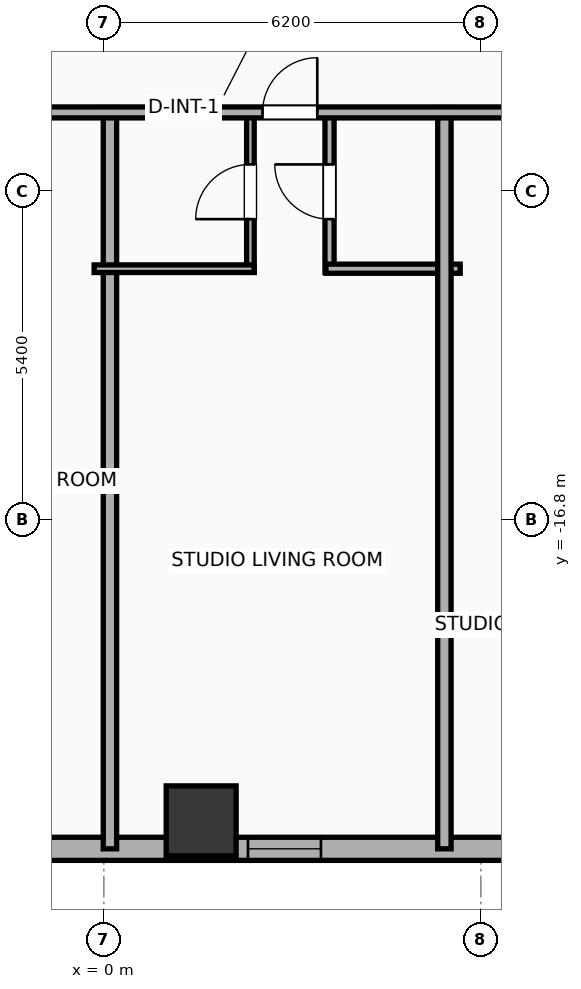
"""IFC4 building model, lengths in metres.
Left out: names, types, materials, properties, quantities, classifications, styles, units other than length and angle.
Written with IfcOpenShell. Run it as: python <this file> out.ifc"""

import sys

from ifc_helpers import new_model, si_unit, direction, frame, frame_2d, origin, origin_2d, place, context, subcontext, project, spatial, rectangle, hollow_rectangle, extrude, element, fill, save


model = new_model("IFC4")
c1 = context("Model", 3, precision=1e-05, world=origin(), true_north=direction((0.0, 1.0)))
c2 = subcontext(c1, "Body", "Model", "MODEL_VIEW")
j1 = project(units=[si_unit("LENGTHUNIT", "METRE"), si_unit("PLANEANGLEUNIT", "RADIAN")], contexts=[c1])
p1 = place(None, origin())
s1 = spatial("IfcSite", under=j1, at=p1, CompositionType="ELEMENT")
p2 = place(p1, origin())
s2 = spatial("IfcBuilding", under=s1, at=p2, CompositionType="ELEMENT")
p3 = place(p2, frame((0.0, 0.0, 37.7)))
s3 = spatial("IfcBuildingStorey", under=s2, at=p3, CompositionType="ELEMENT", Elevation=37.7)
p4 = place(p3, frame((1.6, -21.75, 0.0), z_axis=(0.0, 0.0, 1.0), x_axis=(1.0, 0.0, 0.0)))
e1 = element("IfcColumn", 1, at=p4, inside=s3, PredefinedType="COLUMN", context=c2, shape_type="SweptSolid", body=[
    extrude(hollow_rectangle(XDim=1.15, YDim=1.15, WallThickness=0.04, at=origin_2d()), origin(), (0.0, 0.0, 1.0), 3.9),
])
p5 = place(p3, frame((22.381, -22.21, 0.0), z_axis=(0.0, 0.0, 1.0), x_axis=(-1.0, 0.0, 0.0)))
e2 = element("IfcWall", 2, at=p5, inside=s3, PredefinedType="ELEMENTEDWALL", context=c2, shape_type="SweptSolid", body=[
    extrude(rectangle(XDim=51.963, YDim=0.38, at=frame_2d((25.981, 0.0))), origin(), (0.0, 0.0, 1.0), 3.65),
])
p6 = place(p5, frame((42.952, 0.0, 0.75)))
e3 = element("IfcOpeningElement", 3, at=p6, cuts=e2, PredefinedType="OPENING", context=c2, shape_type="SweptSolid", body=[
    extrude(rectangle(XDim=2.4, YDim=2.1, at=frame_2d((1.2, 1.05))), frame((0.0, 0.2, 0.0), z_axis=(0.0, -1.0, 0.0), x_axis=(1.0, 0.0, 0.0)), (0.0, 0.0, 1.0), 0.4),
])
p7 = place(p5, frame((49.847, 0.0, 0.75)))
e4 = element("IfcOpeningElement", 4, at=p7, cuts=e2, PredefinedType="OPENING", context=c2, shape_type="SweptSolid", body=[
    extrude(rectangle(XDim=1.2, YDim=2.05, at=frame_2d((0.6, 1.025))), frame((0.0, 0.2, 0.0), z_axis=(0.0, -1.0, 0.0), x_axis=(1.0, 0.0, 0.0)), (0.0, 0.0, 1.0), 0.4),
])
p8 = place(p5, frame((47.445, 0.0, 0.75)))
e5 = element("IfcOpeningElement", 5, at=p8, cuts=e2, PredefinedType="OPENING", context=c2, shape_type="SweptSolid", body=[
    extrude(rectangle(XDim=1.2, YDim=2.05, at=frame_2d((0.6, 1.025))), frame((0.0, 0.2, 0.0), z_axis=(0.0, -1.0, 0.0), x_axis=(1.0, 0.0, 0.0)), (0.0, 0.0, 1.0), 0.4),
])
p9 = place(p5, frame((39.526, 0.0, 0.75)))
e6 = element("IfcOpeningElement", 6, at=p9, cuts=e2, PredefinedType="OPENING", context=c2, shape_type="SweptSolid", body=[
    extrude(rectangle(XDim=1.2, YDim=2.05, at=frame_2d((0.6, 1.025))), frame((0.0, 0.2, 0.0), z_axis=(0.0, -1.0, 0.0), x_axis=(1.0, 0.0, 0.0)), (0.0, 0.0, 1.0), 0.4),
])
p10 = place(p5, frame((33.018, 0.0, 0.75)))
e7 = element("IfcOpeningElement", 7, at=p10, cuts=e2, PredefinedType="OPENING", context=c2, shape_type="SweptSolid", body=[
    extrude(rectangle(XDim=1.2, YDim=2.05, at=frame_2d((0.6, 1.025))), frame((0.0, 0.2, 0.0), z_axis=(0.0, -1.0, 0.0), x_axis=(1.0, 0.0, 0.0)), (0.0, 0.0, 1.0), 0.4),
])
p11 = place(p5, frame((36.813, 0.0, 0.75)))
e8 = element("IfcOpeningElement", 8, at=p11, cuts=e2, PredefinedType="OPENING", context=c2, shape_type="SweptSolid", body=[
    extrude(rectangle(XDim=1.2, YDim=2.05, at=frame_2d((0.6, 1.025))), frame((0.0, 0.2, 0.0), z_axis=(0.0, -1.0, 0.0), x_axis=(1.0, 0.0, 0.0)), (0.0, 0.0, 1.0), 0.4),
])
p12 = place(p5, frame((28.886, 0.0, 0.75)))
e9 = element("IfcOpeningElement", 9, at=p12, cuts=e2, PredefinedType="OPENING", context=c2, shape_type="SweptSolid", body=[
    extrude(rectangle(XDim=1.2, YDim=2.05, at=frame_2d((0.6, 1.025))), frame((0.0, 0.2, 0.0), z_axis=(0.0, -1.0, 0.0), x_axis=(1.0, 0.0, 0.0)), (0.0, 0.0, 1.0), 0.4),
])
p13 = place(p5, frame((23.306, 0.0, 0.75)))
e10 = element("IfcOpeningElement", 10, at=p13, cuts=e2, PredefinedType="OPENING", context=c2, shape_type="SweptSolid", body=[
    extrude(rectangle(XDim=1.2, YDim=2.05, at=frame_2d((0.6, 1.025))), frame((0.0, 0.2, 0.0), z_axis=(0.0, -1.0, 0.0), x_axis=(1.0, 0.0, 0.0)), (0.0, 0.0, 1.0), 0.4),
])
p14 = place(p5, frame((26.056, 0.0, 0.75)))
e11 = element("IfcOpeningElement", 11, at=p14, cuts=e2, PredefinedType="OPENING", context=c2, shape_type="SweptSolid", body=[
    extrude(rectangle(XDim=1.2, YDim=2.05, at=frame_2d((0.6, 1.025))), frame((0.0, 0.2, 0.0), z_axis=(0.0, -1.0, 0.0), x_axis=(1.0, 0.0, 0.0)), (0.0, 0.0, 1.0), 0.4),
])
p15 = place(p5, frame((18.811, 0.0, 0.75)))
e12 = element("IfcOpeningElement", 12, at=p15, cuts=e2, PredefinedType="OPENING", context=c2, shape_type="SweptSolid", body=[
    extrude(rectangle(XDim=1.2, YDim=2.05, at=frame_2d((0.6, 1.025))), frame((0.0, 0.2, 0.0), z_axis=(0.0, -1.0, 0.0), x_axis=(1.0, 0.0, 0.0)), (0.0, 0.0, 1.0), 0.4),
])
p16 = place(p5, frame((14.602, 0.0, 0.75)))
e13 = element("IfcOpeningElement", 13, at=p16, cuts=e2, PredefinedType="OPENING", context=c2, shape_type="SweptSolid", body=[
    extrude(rectangle(XDim=1.2, YDim=2.05, at=frame_2d((0.6, 1.025))), frame((0.0, 0.2, 0.0), z_axis=(0.0, -1.0, 0.0), x_axis=(1.0, 0.0, 0.0)), (0.0, 0.0, 1.0), 0.4),
])
p17 = place(p5, frame((11.852, 0.0, 0.75)))
e14 = element("IfcOpeningElement", 14, at=p17, cuts=e2, PredefinedType="OPENING", context=c2, shape_type="SweptSolid", body=[
    extrude(rectangle(XDim=1.2, YDim=2.05, at=frame_2d((0.6, 1.025))), frame((0.0, 0.2, 0.0), z_axis=(0.0, -1.0, 0.0), x_axis=(1.0, 0.0, 0.0)), (0.0, 0.0, 1.0), 0.4),
])
p18 = place(p5, frame((8.316, 0.0, 0.75)))
e15 = element("IfcOpeningElement", 15, at=p18, cuts=e2, PredefinedType="OPENING", context=c2, shape_type="SweptSolid", body=[
    extrude(rectangle(XDim=1.2, YDim=2.05, at=frame_2d((0.6, 1.025))), frame((0.0, 0.2, 0.0), z_axis=(0.0, -1.0, 0.0), x_axis=(1.0, 0.0, 0.0)), (0.0, 0.0, 1.0), 0.4),
])
p19 = place(p5, frame((6.286, 0.0, 0.75)))
e16 = element("IfcOpeningElement", 16, at=p19, cuts=e2, PredefinedType="OPENING", context=c2, shape_type="SweptSolid", body=[
    extrude(rectangle(XDim=1.2, YDim=2.05, at=frame_2d((0.6, 1.025))), frame((0.0, 0.2, 0.0), z_axis=(0.0, -1.0, 0.0), x_axis=(1.0, 0.0, 0.0)), (0.0, 0.0, 1.0), 0.4),
])
p20 = place(p5, frame((3.737, 0.0, 0.75)))
e17 = element("IfcOpeningElement", 17, at=p20, cuts=e2, PredefinedType="OPENING", context=c2, shape_type="SweptSolid", body=[
    extrude(rectangle(XDim=1.2, YDim=2.05, at=frame_2d((0.6, 1.025))), frame((0.0, 0.2, 0.0), z_axis=(0.0, -1.0, 0.0), x_axis=(1.0, 0.0, 0.0)), (0.0, 0.0, 1.0), 0.4),
])
p21 = place(p5, frame((1.291, 0.0, 0.75)))
e18 = element("IfcOpeningElement", 18, at=p21, cuts=e2, PredefinedType="OPENING", context=c2, shape_type="SweptSolid", body=[
    extrude(rectangle(XDim=1.2, YDim=2.05, at=frame_2d((0.6, 1.025))), frame((0.0, 0.2, 0.0), z_axis=(0.0, -1.0, 0.0), x_axis=(1.0, 0.0, 0.0)), (0.0, 0.0, 1.0), 0.4),
])
p22 = place(p3, frame((0.1, -22.21, 0.0), z_axis=(0.0, 0.0, 1.0), x_axis=(0.0, 1.0, 0.0)))
e19 = element("IfcWall", 19, at=p22, inside=s3, PredefinedType="PARTITIONING", context=c2, shape_type="SweptSolid", body=[
    extrude(rectangle(XDim=12.19, YDim=0.22, at=frame_2d((6.095, 0.0))), origin(), (0.0, 0.0, 1.0), 3.65),
])
p23 = place(p3, frame((2.41, -12.73, 0.0), z_axis=(0.0, 0.0, 1.0), x_axis=(0.0, 1.0, 0.0)))
e20 = element("IfcWall", 20, at=p23, inside=s3, PredefinedType="PARTITIONING", context=c2, shape_type="SweptSolid", body=[
    extrude(rectangle(XDim=2.65, YDim=0.125, at=frame_2d((1.325, 0.0))), origin(), (0.0, 0.0, 1.0), 3.65),
])
p24 = place(p23, frame((0.875, 0.0, 0.0)))
e21 = element("IfcOpeningElement", 21, at=p24, cuts=e20, PredefinedType="OPENING", context=c2, shape_type="SweptSolid", body=[
    extrude(rectangle(XDim=0.9, YDim=2.05, at=frame_2d((0.45, 1.025))), frame((0.0, 0.073, 0.0), z_axis=(0.0, -1.0, 0.0), x_axis=(1.0, 0.0, 0.0)), (0.0, 0.0, 1.0), 0.145),
])
p25 = place(p3, frame((3.711, -12.73, 0.0), z_axis=(0.0, 0.0, 1.0), x_axis=(0.0, 1.0, 0.0)))
e22 = element("IfcWall", 22, at=p25, inside=s3, PredefinedType="PLUMBINGWALL", context=c2, shape_type="SweptSolid", body=[
    extrude(rectangle(XDim=2.65, YDim=0.15, at=frame_2d((1.325, 0.0))), origin(), (0.0, 0.0, 1.0), 2.94),
])
p26 = place(p25, frame((0.875, 0.0, 0.0)))
e23 = element("IfcOpeningElement", 23, at=p26, cuts=e22, PredefinedType="OPENING", context=c2, shape_type="SweptSolid", body=[
    extrude(rectangle(XDim=0.9, YDim=2.05, at=frame_2d((0.45, 1.025))), frame((0.0, 0.085, 0.0), z_axis=(0.0, -1.0, 0.0), x_axis=(1.0, 0.0, 0.0)), (0.0, 0.0, 1.0), 0.17),
])
p27 = place(p3, frame((-0.16, -12.67, 0.0), z_axis=(0.0, 0.0, 1.0), x_axis=(1.0, 0.0, 0.0)))
e24 = element("IfcWall", 24, at=p27, inside=s3, PredefinedType="PARTITIONING", context=c2, shape_type="SweptSolid", body=[
    extrude(rectangle(XDim=2.63, YDim=0.125, at=frame_2d((1.315, 0.0))), origin(), (0.0, 0.0, 1.0), 3.65),
])
p28 = place(p3, frame((3.651, -12.67, 0.0), z_axis=(0.0, 0.0, 1.0), x_axis=(1.0, 0.0, 0.0)))
e25 = element("IfcWall", 25, at=p28, inside=s3, PredefinedType="PLUMBINGWALL", context=c2, shape_type="SweptSolid", body=[
    extrude(rectangle(XDim=2.209, YDim=0.15, at=frame_2d((1.104, 0.0))), origin(), (0.0, 0.0, 1.0), 3.65),
])
p29 = place(p3, frame((5.6, -22.21, 0.0), z_axis=(0.0, 0.0, 1.0), x_axis=(0.0, 1.0, 0.0)))
e26 = element("IfcWall", 26, at=p29, inside=s3, PredefinedType="PARTITIONING", context=c2, shape_type="SweptSolid", body=[
    extrude(rectangle(XDim=12.19, YDim=0.22, at=frame_2d((6.095, 0.0))), origin(), (0.0, 0.0, 1.0), 3.65),
])
p30 = place(p3, frame((-33.41, -10.1, 0.0), z_axis=(0.0, 0.0, 1.0), x_axis=(1.0, 0.0, 0.0)))
e27 = element("IfcWall", 27, at=p30, inside=s3, PredefinedType="PARTITIONING", context=c2, shape_type="SweptSolid", body=[
    extrude(rectangle(XDim=59.62, YDim=0.18, at=frame_2d((29.81, 0.0))), origin(), (0.0, 0.0, 1.0), 3.65),
])
p31 = place(p30, frame((2.746, 0.0, 0.0)))
e28 = element("IfcOpeningElement", 28, at=p31, cuts=e27, PredefinedType="OPENING", context=c2, shape_type="SweptSolid", body=[
    extrude(rectangle(XDim=0.9, YDim=2.05, at=frame_2d((0.45, 1.025))), frame((0.0, 0.1, 0.0), z_axis=(0.0, -1.0, 0.0), x_axis=(1.0, 0.0, 0.0)), (0.0, 0.0, 1.0), 0.2),
])
p32 = place(p30, frame((11.552, 0.0, 0.0)))
e29 = element("IfcOpeningElement", 29, at=p32, cuts=e27, PredefinedType="OPENING", context=c2, shape_type="SweptSolid", body=[
    extrude(rectangle(XDim=1.15, YDim=2.05, at=frame_2d((0.575, 1.025))), frame((0.0, 0.1, 0.0), z_axis=(0.0, -1.0, 0.0), x_axis=(1.0, 0.0, 0.0)), (0.0, 0.0, 1.0), 0.2),
])
p33 = place(p30, frame((22.379, 0.0, 0.0)))
e30 = element("IfcOpeningElement", 30, at=p33, cuts=e27, PredefinedType="OPENING", context=c2, shape_type="SweptSolid", body=[
    extrude(rectangle(XDim=1.15, YDim=2.05, at=frame_2d((0.575, 1.025))), frame((0.0, 0.1, 0.0), z_axis=(0.0, -1.0, 0.0), x_axis=(1.0, 0.0, 0.0)), (0.0, 0.0, 1.0), 0.2),
])
p34 = place(p30, frame((31.28, 0.0, 0.0)))
e31 = element("IfcOpeningElement", 31, at=p34, cuts=e27, PredefinedType="OPENING", context=c2, shape_type="SweptSolid", body=[
    extrude(rectangle(XDim=1.15, YDim=2.05, at=frame_2d((0.575, 1.025))), frame((0.0, 0.1, 0.0), z_axis=(0.0, -1.0, 0.0), x_axis=(1.0, 0.0, 0.0)), (0.0, 0.0, 1.0), 0.2),
])
p35 = place(p30, frame((36.02, 0.0, 0.0)))
e32 = element("IfcOpeningElement", 32, at=p35, cuts=e27, PredefinedType="OPENING", context=c2, shape_type="SweptSolid", body=[
    extrude(rectangle(XDim=0.9, YDim=2.05, at=frame_2d((0.45, 1.025))), frame((0.0, 0.1, 0.0), z_axis=(0.0, -1.0, 0.0), x_axis=(1.0, 0.0, 0.0)), (0.0, 0.0, 1.0), 0.2),
])
p36 = place(p30, frame((40.044, 0.0, 0.0)))
e33 = element("IfcOpeningElement", 33, at=p36, cuts=e27, PredefinedType="OPENING", context=c2, shape_type="SweptSolid", body=[
    extrude(rectangle(XDim=1.15, YDim=2.05, at=frame_2d((0.575, 1.025))), frame((0.0, 0.1, 0.0), z_axis=(0.0, -1.0, 0.0), x_axis=(1.0, 0.0, 0.0)), (0.0, 0.0, 1.0), 0.2),
])
p37 = place(p30, frame((45.613, 0.0, 0.0)))
e34 = element("IfcOpeningElement", 34, at=p37, cuts=e27, PredefinedType="OPENING", context=c2, shape_type="SweptSolid", body=[
    extrude(rectangle(XDim=1.15, YDim=2.05, at=frame_2d((0.575, 1.025))), frame((0.0, 0.1, 0.0), z_axis=(0.0, -1.0, 0.0), x_axis=(1.0, 0.0, 0.0)), (0.0, 0.0, 1.0), 0.2),
])
p38 = place(p30, frame((54.174, 0.0, 0.0)))
e35 = element("IfcOpeningElement", 35, at=p38, cuts=e27, PredefinedType="OPENING", context=c2, shape_type="SweptSolid", body=[
    extrude(rectangle(XDim=1.15, YDim=2.05, at=frame_2d((0.575, 1.025))), frame((0.0, 0.1, 0.0), z_axis=(0.0, -1.0, 0.0), x_axis=(1.0, 0.0, 0.0)), (0.0, 0.0, 1.0), 0.2),
])
p39 = place(p15, origin())
e36 = element("IfcWindow", 36, at=p39, inside=s3, PartitioningType="SINGLE_PANEL", PredefinedType="WINDOW", context=c2, shape_type="SweptSolid", body=[
    extrude(rectangle(XDim=1.2, YDim=2.05, at=frame_2d((0.6, 1.025))), frame((0.0, 0.03, 0.0), z_axis=(0.0, -1.0, 0.0), x_axis=(1.0, 0.0, 0.0)), (0.0, 0.0, 1.0), 0.06),
])
fill(e12, e36)
p40 = place(p24, origin())
e37 = element("IfcDoor", 37, at=p40, inside=s3, OperationType="SINGLE_SWING_LEFT", PredefinedType="DOOR", context=c2, shape_type="SweptSolid", body=[
    extrude(rectangle(XDim=0.9, YDim=2.05, at=frame_2d((0.45, 1.025))), frame((0.0, 0.025, 0.0), z_axis=(0.0, -1.0, 0.0), x_axis=(1.0, 0.0, 0.0)), (0.0, 0.0, 1.0), 0.05),
])
fill(e21, e37)
p41 = place(p26, origin())
e38 = element("IfcDoor", 38, at=p41, inside=s3, OperationType="SINGLE_SWING_RIGHT", PredefinedType="DOOR", context=c2, shape_type="SweptSolid", body=[
    extrude(rectangle(XDim=0.9, YDim=2.05, at=frame_2d((0.45, 1.025))), frame((0.0, 0.025, 0.0), z_axis=(0.0, -1.0, 0.0), x_axis=(1.0, 0.0, 0.0)), (0.0, 0.0, 1.0), 0.05),
])
fill(e23, e38)
p42 = place(p35, origin())
e39 = element("IfcDoor", 39, at=p42, inside=s3, OperationType="SINGLE_SWING_RIGHT", PredefinedType="DOOR", context=c2, shape_type="SweptSolid", body=[
    extrude(rectangle(XDim=0.9, YDim=2.05, at=frame_2d((0.45, 1.025))), frame((0.0, 0.025, 0.0), z_axis=(0.0, -1.0, 0.0), x_axis=(1.0, 0.0, 0.0)), (0.0, 0.0, 1.0), 0.05),
])
fill(e32, e39)
save(model, sys.argv[1])
